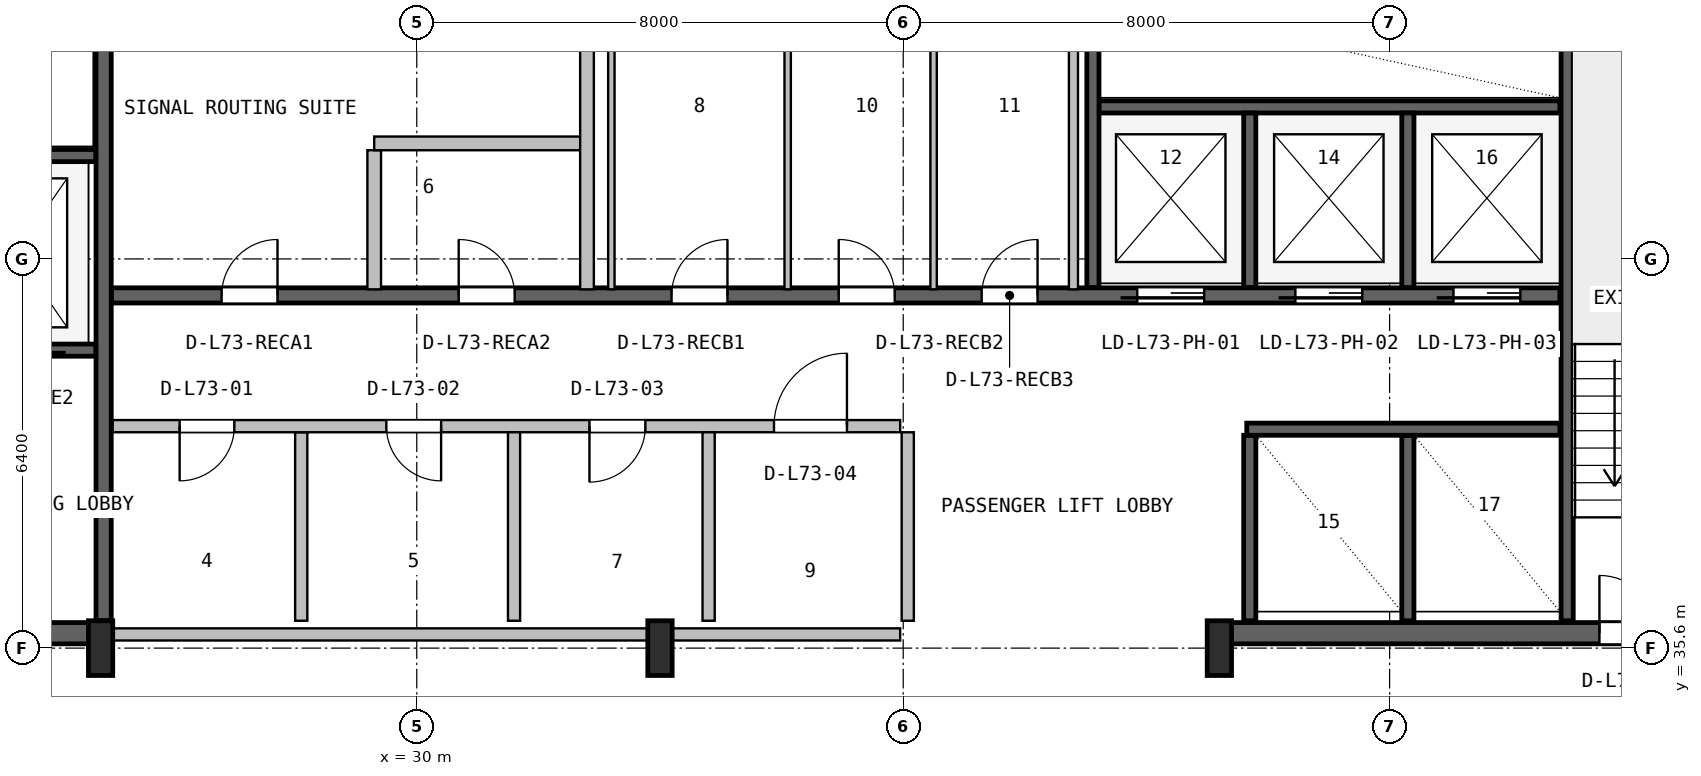
"""IFC4 building model, lengths in metres.
Left out: names, types, materials, properties, quantities, classifications, styles, units other than length and angle.
Written with IfcOpenShell. Run it as: python <this file> out.ifc"""

import sys

from ifc_helpers import new_model, si_unit, direction, frame, frame_2d, origin, origin_2d, place, context, subcontext, project, spatial, rectangle, i_section, extrude, source, transform, mapped, element, fill, save


model = new_model("IFC4")
c1 = context("Model", 3, precision=1e-05, world=origin(), true_north=direction((0.0, 1.0)))
c2 = subcontext(c1, "Body", "Model", "MODEL_VIEW")
j1 = project(units=[si_unit("LENGTHUNIT", "METRE"), si_unit("PLANEANGLEUNIT", "RADIAN")], contexts=[c1])
p1 = place(None, origin())
s1 = spatial("IfcSite", under=j1, at=p1, CompositionType="ELEMENT")
p2 = place(p1, origin())
s2 = spatial("IfcBuilding", under=s1, at=p2, CompositionType="ELEMENT")
p3 = place(p2, frame((0.0, 0.0, 292.6)))
s3 = spatial("IfcBuildingStorey", under=s2, at=p3, CompositionType="ELEMENT", Elevation=292.6)
p4 = place(p3, frame((15.67, 35.845, 0.0), z_axis=(0.0, 0.0, 1.0), x_axis=(1.0, 0.0, 0.0)))
e1 = element("IfcWall", 1, at=p4, inside=s3, PredefinedType="SHEAR", context=c2, shape_type="SweptSolid", body=[
    extrude(rectangle(XDim=9.13, YDim=0.35, at=frame_2d((4.565, 0.0))), origin(), (0.0, 0.0, 1.0), 3.55),
])
p5 = place(p4, frame((5.4, 0.0, 0.0)))
e2 = element("IfcOpeningElement", 2, at=p5, cuts=e1, PredefinedType="OPENING", context=c2, shape_type="SweptSolid", body=[
    extrude(rectangle(XDim=1.0, YDim=2.1, at=frame_2d((0.5, 1.05))), frame((0.0, 0.185, 0.0), z_axis=(0.0, -1.0, 0.0), x_axis=(1.0, 0.0, 0.0)), (0.0, 0.0, 1.0), 0.37),
])
p6 = place(p3, frame((43.2, 35.845, 0.0), z_axis=(0.0, 0.0, 1.0), x_axis=(1.0, 0.0, 0.0)))
e3 = element("IfcWall", 3, at=p6, inside=s3, PredefinedType="SHEAR", context=c2, shape_type="SweptSolid", body=[
    extrude(rectangle(XDim=9.13, YDim=0.35, at=frame_2d((4.565, 0.0))), origin(), (0.0, 0.0, 1.0), 3.55),
])
p7 = place(p6, frame((6.25, 0.0, 0.0)))
e4 = element("IfcOpeningElement", 4, at=p7, cuts=e3, PredefinedType="OPENING", context=c2, shape_type="SweptSolid", body=[
    extrude(rectangle(XDim=0.95, YDim=2.1, at=frame_2d((0.475, 1.05))), frame((0.0, 0.185, 0.0), z_axis=(0.0, -1.0, 0.0), x_axis=(1.0, 0.0, 0.0)), (0.0, 0.0, 1.0), 0.37),
])
m1 = source(origin(), c2, "Body", "SweptSolid", [
    extrude(i_section(OverallWidth=0.4, OverallDepth=0.9, WebThickness=0.016, FlangeThickness=0.028, FilletRadius=0.016, at=origin_2d()), origin(), (0.0, 0.0, 1.0), 3.8),
])
for number, where, z_axis, x_axis in (
    (5, (24.8, 35.6, 0.0), (0.0, 0.0, 1.0), (1.0, 0.0, 0.0)),
    (6, (34.0, 35.6, 0.0), (0.0, 0.0, 1.0), (1.0, 0.0, 0.0)),
    (7, (43.2, 35.6, 0.0), (0.0, 0.0, 1.0), (1.0, 0.0, 0.0)),
):
    element("IfcColumn", number, at=place(p3, frame(where, z_axis=z_axis, x_axis=x_axis)), inside=s3, PredefinedType="COLUMN", context=c2, shape_type="MappedRepresentation", body=[
        mapped(m1, transform((0.0, 0.0, 0.0), x_axis=(1.0, 0.0, 0.0), y_axis=(0.0, 1.0, 0.0), z_axis=(0.0, 0.0, 1.0), scale=1.0)),
    ])
p8 = place(p3, frame((24.85, 36.05, 0.0), z_axis=(0.0, 0.0, 1.0), x_axis=(0.0, 1.0, 0.0)))
e8 = element("IfcWall", 8, at=p8, inside=s3, PredefinedType="SHEAR", context=c2, shape_type="SweptSolid", body=[
    extrude(rectangle(XDim=10.45, YDim=0.25, at=frame_2d((5.225, 0.0))), origin(), (0.0, 0.0, 1.0), 3.55),
])
p9 = place(p3, frame((19.2, 40.5, 0.0), z_axis=(0.0, 0.0, 1.0), x_axis=(1.0, 0.0, 0.0)))
e9 = element("IfcWall", 9, at=p9, inside=s3, PredefinedType="SHEAR", context=c2, shape_type="SweptSolid", body=[
    extrude(rectangle(XDim=5.52, YDim=0.2, at=frame_2d((2.76, 0.0))), origin(), (0.0, 0.0, 1.0), 3.55),
])
p10 = place(p9, frame((1.05, 0.0, 0.0)))
e10 = element("IfcOpeningElement", 10, at=p10, cuts=e9, PredefinedType="OPENING", context=c2, shape_type="SweptSolid", body=[
    extrude(rectangle(XDim=1.1, YDim=2.18, at=frame_2d((0.55, 1.09))), frame((0.0, 0.11, 0.0), z_axis=(0.0, -1.0, 0.0), x_axis=(1.0, 0.0, 0.0)), (0.0, 0.0, 1.0), 0.22),
])
p11 = place(p9, frame((3.65, 0.0, 0.0)))
e11 = element("IfcOpeningElement", 11, at=p11, cuts=e9, PredefinedType="OPENING", context=c2, shape_type="SweptSolid", body=[
    extrude(rectangle(XDim=1.1, YDim=2.18, at=frame_2d((0.55, 1.09))), frame((0.0, 0.11, 0.0), z_axis=(0.0, -1.0, 0.0), x_axis=(1.0, 0.0, 0.0)), (0.0, 0.0, 1.0), 0.22),
])
p12 = place(p3, frame((19.2, 43.7, 0.0), z_axis=(0.0, 0.0, 1.0), x_axis=(1.0, 0.0, 0.0)))
e12 = element("IfcWall", 12, at=p12, inside=s3, PredefinedType="SHEAR", context=c2, shape_type="SweptSolid", body=[
    extrude(rectangle(XDim=5.52, YDim=0.2, at=frame_2d((2.76, 0.0))), origin(), (0.0, 0.0, 1.0), 3.55),
])
p13 = place(p3, frame((48.92, 36.05, 0.0), z_axis=(0.0, 0.0, 1.0), x_axis=(0.0, 1.0, 0.0)))
e13 = element("IfcWall", 13, at=p13, inside=s3, PredefinedType="SHEAR", context=c2, shape_type="SweptSolid", body=[
    extrude(rectangle(XDim=10.5, YDim=0.2, at=frame_2d((5.25, 0.0))), origin(), (0.0, 0.0, 1.0), 3.55),
])
p14 = place(p3, frame((24.98, 41.4, 0.0), z_axis=(0.0, 0.0, 1.0), x_axis=(1.0, 0.0, 0.0)))
e14 = element("IfcWall", 14, at=p14, inside=s3, PredefinedType="SHEAR", context=c2, shape_type="SweptSolid", body=[
    extrude(rectangle(XDim=23.82, YDim=0.25, at=frame_2d((11.91, 0.0))), origin(), (0.0, 0.0, 1.0), 3.55),
])
p15 = place(p14, frame((16.87, 0.0, 0.0)))
e15 = element("IfcOpeningElement", 15, at=p15, cuts=e14, PredefinedType="OPENING", context=c2, shape_type="SweptSolid", body=[
    extrude(rectangle(XDim=1.1, YDim=2.18, at=frame_2d((0.55, 1.09))), frame((0.0, 0.135, 0.0), z_axis=(0.0, -1.0, 0.0), x_axis=(1.0, 0.0, 0.0)), (0.0, 0.0, 1.0), 0.27),
])
p16 = place(p14, frame((19.47, 0.0, 0.0)))
e16 = element("IfcOpeningElement", 16, at=p16, cuts=e14, PredefinedType="OPENING", context=c2, shape_type="SweptSolid", body=[
    extrude(rectangle(XDim=1.1, YDim=2.18, at=frame_2d((0.55, 1.09))), frame((0.0, 0.135, 0.0), z_axis=(0.0, -1.0, 0.0), x_axis=(1.0, 0.0, 0.0)), (0.0, 0.0, 1.0), 0.27),
])
p17 = place(p14, frame((22.07, 0.0, 0.0)))
e17 = element("IfcOpeningElement", 17, at=p17, cuts=e14, PredefinedType="OPENING", context=c2, shape_type="SweptSolid", body=[
    extrude(rectangle(XDim=1.1, YDim=2.18, at=frame_2d((0.55, 1.09))), frame((0.0, 0.135, 0.0), z_axis=(0.0, -1.0, 0.0), x_axis=(1.0, 0.0, 0.0)), (0.0, 0.0, 1.0), 0.27),
])
p18 = place(p14, frame((1.81, 0.0, 0.0)))
e18 = element("IfcOpeningElement", 18, at=p18, cuts=e14, PredefinedType="OPENING", context=c2, shape_type="SweptSolid", body=[
    extrude(rectangle(XDim=0.92, YDim=2.08, at=frame_2d((0.46, 1.04))), frame((0.0, 0.135, 0.0), z_axis=(0.0, -1.0, 0.0), x_axis=(1.0, 0.0, 0.0)), (0.0, 0.0, 1.0), 0.27),
])
p19 = place(p14, frame((5.71, 0.0, 0.0)))
e19 = element("IfcOpeningElement", 19, at=p19, cuts=e14, PredefinedType="OPENING", context=c2, shape_type="SweptSolid", body=[
    extrude(rectangle(XDim=0.92, YDim=2.08, at=frame_2d((0.46, 1.04))), frame((0.0, 0.135, 0.0), z_axis=(0.0, -1.0, 0.0), x_axis=(1.0, 0.0, 0.0)), (0.0, 0.0, 1.0), 0.27),
])
p20 = place(p14, frame((9.21, 0.0, 0.0)))
e20 = element("IfcOpeningElement", 20, at=p20, cuts=e14, PredefinedType="OPENING", context=c2, shape_type="SweptSolid", body=[
    extrude(rectangle(XDim=0.92, YDim=2.08, at=frame_2d((0.46, 1.04))), frame((0.0, 0.135, 0.0), z_axis=(0.0, -1.0, 0.0), x_axis=(1.0, 0.0, 0.0)), (0.0, 0.0, 1.0), 0.27),
])
p21 = place(p14, frame((11.96, 0.0, 0.0)))
e21 = element("IfcOpeningElement", 21, at=p21, cuts=e14, PredefinedType="OPENING", context=c2, shape_type="SweptSolid", body=[
    extrude(rectangle(XDim=0.92, YDim=2.08, at=frame_2d((0.46, 1.04))), frame((0.0, 0.135, 0.0), z_axis=(0.0, -1.0, 0.0), x_axis=(1.0, 0.0, 0.0)), (0.0, 0.0, 1.0), 0.27),
])
p22 = place(p14, frame((14.31, 0.0, 0.0)))
e22 = element("IfcOpeningElement", 22, at=p22, cuts=e14, PredefinedType="OPENING", context=c2, shape_type="SweptSolid", body=[
    extrude(rectangle(XDim=0.92, YDim=2.08, at=frame_2d((0.46, 1.04))), frame((0.0, 0.135, 0.0), z_axis=(0.0, -1.0, 0.0), x_axis=(1.0, 0.0, 0.0)), (0.0, 0.0, 1.0), 0.27),
])
p23 = place(p3, frame((41.22, 44.5, 0.0), z_axis=(0.0, 0.0, 1.0), x_axis=(1.0, 0.0, 0.0)))
e23 = element("IfcWall", 23, at=p23, inside=s3, PredefinedType="SHEAR", context=c2, shape_type="SweptSolid", body=[
    extrude(rectangle(XDim=7.58, YDim=0.2, at=frame_2d((3.79, 0.0))), origin(), (0.0, 0.0, 1.0), 3.55),
])
p24 = place(p3, frame((41.12, 41.53, 0.0), z_axis=(0.0, 0.0, 1.0), x_axis=(0.0, 1.0, 0.0)))
e24 = element("IfcWall", 24, at=p24, inside=s3, PredefinedType="SHEAR", context=c2, shape_type="SweptSolid", body=[
    extrude(rectangle(XDim=5.02, YDim=0.2, at=frame_2d((2.51, 0.0))), origin(), (0.0, 0.0, 1.0), 3.55),
])
for number, where, z_axis, x_axis in (
    (25, (43.7, 41.53, 0.0), (0.0, 0.0, 1.0), (0.0, 1.0, 0.0)),
    (26, (46.3, 41.53, 0.0), (0.0, 0.0, 1.0), (0.0, 1.0, 0.0)),
):
    element("IfcWall", number, at=place(p3, frame(where, z_axis=z_axis, x_axis=x_axis)), inside=s3, PredefinedType="SHEAR", context=c2, shape_type="SweptSolid", body=[
        extrude(rectangle(XDim=2.87, YDim=0.2, at=frame_2d((1.435, 0.0))), origin(), (0.0, 0.0, 1.0), 3.55),
    ])
for number, where, z_axis, x_axis in (
    (27, (43.7, 36.05, 0.0), (0.0, 0.0, 1.0), (0.0, 1.0, 0.0)),
    (28, (46.3, 36.05, 0.0), (0.0, 0.0, 1.0), (0.0, 1.0, 0.0)),
):
    element("IfcWall", number, at=place(p3, frame(where, z_axis=z_axis, x_axis=x_axis)), inside=s3, PredefinedType="SHEAR", context=c2, shape_type="SweptSolid", body=[
        extrude(rectangle(XDim=3.05, YDim=0.2, at=frame_2d((1.525, 0.0))), origin(), (0.0, 0.0, 1.0), 3.55),
    ])
p25 = place(p3, frame((43.65, 39.2, 0.0), z_axis=(0.0, 0.0, 1.0), x_axis=(1.0, 0.0, 0.0)))
e29 = element("IfcWall", 29, at=p25, inside=s3, PredefinedType="SHEAR", context=c2, shape_type="SweptSolid", body=[
    extrude(rectangle(XDim=5.15, YDim=0.2, at=frame_2d((2.575, 0.0))), origin(), (0.0, 0.0, 1.0), 3.55),
])
p26 = place(p3, frame((25.0, 35.825, 0.0), z_axis=(0.0, 0.0, 1.0), x_axis=(1.0, 0.0, 0.0)))
e30 = element("IfcWall", 30, at=p26, inside=s3, PredefinedType="SOLIDWALL", context=c2, shape_type="SweptSolid", body=[
    extrude(rectangle(XDim=12.95, YDim=0.2, at=frame_2d((6.475, 0.0))), origin(), (0.0, 0.0, 1.0), 2.575),
])
p27 = place(p3, frame((28.1, 36.05, 0.0), z_axis=(0.0, 0.0, 1.0), x_axis=(0.0, 1.0, 0.0)))
e31 = element("IfcWall", 31, at=p27, inside=s3, PredefinedType="PLUMBINGWALL", context=c2, shape_type="SweptSolid", body=[
    extrude(rectangle(XDim=3.1, YDim=0.2, at=frame_2d((1.55, 0.0))), origin(), (0.0, 0.0, 1.0), 3.53),
])
p28 = place(p3, frame((25.0, 39.25, 0.0), z_axis=(0.0, 0.0, 1.0), x_axis=(1.0, 0.0, 0.0)))
e32 = element("IfcWall", 32, at=p28, inside=s3, PredefinedType="SOLIDWALL", context=c2, shape_type="SweptSolid", body=[
    extrude(rectangle(XDim=12.95, YDim=0.2, at=frame_2d((6.475, 0.0))), origin(), (0.0, 0.0, 1.0), 3.53),
])
p29 = place(p28, frame((1.1, 0.0, 0.0)))
e33 = element("IfcOpeningElement", 33, at=p29, cuts=e32, PredefinedType="OPENING", context=c2, shape_type="SweptSolid", body=[
    extrude(rectangle(XDim=0.9, YDim=2.06, at=frame_2d((0.45, 1.03))), frame((0.0, 0.11, 0.0), z_axis=(0.0, -1.0, 0.0), x_axis=(1.0, 0.0, 0.0)), (0.0, 0.0, 1.0), 0.22),
])
p30 = place(p28, frame((4.5, 0.0, 0.0)))
e34 = element("IfcOpeningElement", 34, at=p30, cuts=e32, PredefinedType="OPENING", context=c2, shape_type="SweptSolid", body=[
    extrude(rectangle(XDim=0.9, YDim=2.06, at=frame_2d((0.45, 1.03))), frame((0.0, 0.11, 0.0), z_axis=(0.0, -1.0, 0.0), x_axis=(1.0, 0.0, 0.0)), (0.0, 0.0, 1.0), 0.22),
])
p31 = place(p28, frame((7.84, 0.0, 0.0)))
e35 = element("IfcOpeningElement", 35, at=p31, cuts=e32, PredefinedType="OPENING", context=c2, shape_type="SweptSolid", body=[
    extrude(rectangle(XDim=0.92, YDim=2.08, at=frame_2d((0.46, 1.04))), frame((0.0, 0.11, 0.0), z_axis=(0.0, -1.0, 0.0), x_axis=(1.0, 0.0, 0.0)), (0.0, 0.0, 1.0), 0.22),
])
p32 = place(p28, frame((10.875, 0.0, 0.0)))
e36 = element("IfcOpeningElement", 36, at=p32, cuts=e32, PredefinedType="OPENING", context=c2, shape_type="SweptSolid", body=[
    extrude(rectangle(XDim=1.2, YDim=2.1, at=frame_2d((0.6, 1.05))), frame((0.0, 0.11, 0.0), z_axis=(0.0, -1.0, 0.0), x_axis=(1.0, 0.0, 0.0)), (0.0, 0.0, 1.0), 0.22),
])
p33 = place(p3, frame((31.6, 36.05, 0.0), z_axis=(0.0, 0.0, 1.0), x_axis=(0.0, 1.0, 0.0)))
e37 = element("IfcWall", 37, at=p33, inside=s3, PredefinedType="PLUMBINGWALL", context=c2, shape_type="SweptSolid", body=[
    extrude(rectangle(XDim=3.1, YDim=0.2, at=frame_2d((1.55, 0.0))), origin(), (0.0, 0.0, 1.0), 3.53),
])
for number, where, z_axis, x_axis in (
    (38, (34.8, 36.05, 0.0), (0.0, 0.0, 1.0), (0.0, 1.0, 0.0)),
    (39, (38.075, 36.05, 0.0), (0.0, 0.0, 1.0), (0.0, 1.0, 0.0)),
):
    element("IfcWall", number, at=place(p3, frame(where, z_axis=z_axis, x_axis=x_axis)), inside=s3, PredefinedType="SOLIDWALL", context=c2, shape_type="SweptSolid", body=[
        extrude(rectangle(XDim=3.1, YDim=0.2, at=frame_2d((1.55, 0.0))), origin(), (0.0, 0.0, 1.0), 3.53),
    ])
p34 = place(p3, frame((29.3, 41.5, 0.0), z_axis=(0.0, 0.0, 1.0), x_axis=(0.0, 1.0, 0.0)))
e40 = element("IfcWall", 40, at=p34, inside=s3, PredefinedType="PARTITIONING", context=c2, shape_type="SweptSolid", body=[
    extrude(rectangle(XDim=2.288, YDim=0.225, at=frame_2d((1.144, 0.0))), origin(), (0.0, 0.0, 1.0), 3.53),
])
p35 = place(p3, frame((29.3, 43.9, 0.0), z_axis=(0.0, 0.0, 1.0), x_axis=(1.0, 0.0, 0.0)))
e41 = element("IfcWall", 41, at=p35, inside=s3, PredefinedType="PARTITIONING", context=c2, shape_type="SweptSolid", body=[
    extrude(rectangle(XDim=3.5, YDim=0.225, at=frame_2d((1.75, 0.0))), origin(), (0.0, 0.0, 1.0), 3.53),
])
p36 = place(p3, frame((32.8, 41.5, 0.0), z_axis=(0.0, 0.0, 1.0), x_axis=(0.0, 1.0, 0.0)))
e42 = element("IfcWall", 42, at=p36, inside=s3, PredefinedType="PARTITIONING", context=c2, shape_type="SweptSolid", body=[
    extrude(rectangle(XDim=5.02, YDim=0.225, at=frame_2d((2.51, 0.0))), origin(), (0.0, 0.0, 1.0), 3.53),
])
for number, where, z_axis, x_axis in (
    (43, (36.1, 41.5, 0.0), (0.0, 0.0, 1.0), (0.0, 1.0, 0.0)),
    (44, (33.2, 41.5, 0.0), (0.0, 0.0, 1.0), (0.0, 1.0, 0.0)),
    (45, (38.5, 41.5, 0.0), (0.0, 0.0, 1.0), (0.0, 1.0, 0.0)),
):
    element("IfcWall", number, at=place(p3, frame(where, z_axis=z_axis, x_axis=x_axis)), inside=s3, PredefinedType="PARTITIONING", context=c2, shape_type="SweptSolid", body=[
        extrude(rectangle(XDim=5.02, YDim=0.105, at=frame_2d((2.51, 0.0))), origin(), (0.0, 0.0, 1.0), 3.53),
    ])
p37 = place(p3, frame((40.8, 41.5, 0.0), z_axis=(0.0, 0.0, 1.0), x_axis=(0.0, 1.0, 0.0)))
e46 = element("IfcWall", 46, at=p37, inside=s3, PredefinedType="PARTITIONING", context=c2, shape_type="SweptSolid", body=[
    extrude(rectangle(XDim=5.02, YDim=0.15, at=frame_2d((2.51, 0.0))), origin(), (0.0, 0.0, 1.0), 3.53),
])
m2 = source(origin(), c2, "Body", "SweptSolid", [
    extrude(rectangle(XDim=0.95, YDim=2.1, at=frame_2d((0.475, 1.05))), frame((0.0, 0.025, 0.0), z_axis=(0.0, -1.0, 0.0), x_axis=(1.0, 0.0, 0.0)), (0.0, 0.0, 1.0), 0.05),
])
p38 = place(p7, origin())
e47 = element("IfcDoor", 47, at=p38, inside=s3, OperationType="SINGLE_SWING_LEFT", PredefinedType="DOOR", context=c2, shape_type="MappedRepresentation", body=[
    mapped(m2, transform((0.0, 0.0, 0.0), x_axis=(1.0, 0.0, 0.0), y_axis=(0.0, 1.0, 0.0), z_axis=(0.0, 0.0, 1.0), scale=1.0)),
])
fill(e4, e47)
m3 = source(origin(), c2, "Body", "SweptSolid", [
    extrude(rectangle(XDim=1.1, YDim=2.18, at=frame_2d((0.55, 1.09))), frame((0.0, 0.025, 0.0), z_axis=(0.0, -1.0, 0.0), x_axis=(1.0, 0.0, 0.0)), (0.0, 0.0, 1.0), 0.05),
])
p39 = place(p15, frame((1.1, 0.0, 0.0), z_axis=(0.0, 0.0, 1.0), x_axis=(-1.0, 0.0, 0.0)))
e48 = element("IfcDoor", 48, at=p39, inside=s3, OperationType="SLIDING_TO_LEFT", PredefinedType="DOOR", context=c2, shape_type="MappedRepresentation", body=[
    mapped(m3, transform((0.0, 0.0, 0.0), x_axis=(1.0, 0.0, 0.0), y_axis=(0.0, 1.0, 0.0), z_axis=(0.0, 0.0, 1.0), scale=1.0)),
])
fill(e15, e48)
p40 = place(p16, frame((1.1, 0.0, 0.0), z_axis=(0.0, 0.0, 1.0), x_axis=(-1.0, 0.0, 0.0)))
e49 = element("IfcDoor", 49, at=p40, inside=s3, OperationType="SLIDING_TO_LEFT", PredefinedType="DOOR", context=c2, shape_type="MappedRepresentation", body=[
    mapped(m3, transform((0.0, 0.0, 0.0), x_axis=(1.0, 0.0, 0.0), y_axis=(0.0, 1.0, 0.0), z_axis=(0.0, 0.0, 1.0), scale=1.0)),
])
fill(e16, e49)
p41 = place(p17, frame((1.1, 0.0, 0.0), z_axis=(0.0, 0.0, 1.0), x_axis=(-1.0, 0.0, 0.0)))
e50 = element("IfcDoor", 50, at=p41, inside=s3, OperationType="SLIDING_TO_LEFT", PredefinedType="DOOR", context=c2, shape_type="MappedRepresentation", body=[
    mapped(m3, transform((0.0, 0.0, 0.0), x_axis=(1.0, 0.0, 0.0), y_axis=(0.0, 1.0, 0.0), z_axis=(0.0, 0.0, 1.0), scale=1.0)),
])
fill(e17, e50)
m4 = source(origin(), c2, "Body", "SweptSolid", [
    extrude(rectangle(XDim=0.92, YDim=2.08, at=frame_2d((0.46, 1.04))), frame((0.0, 0.025, 0.0), z_axis=(0.0, -1.0, 0.0), x_axis=(1.0, 0.0, 0.0)), (0.0, 0.0, 1.0), 0.05),
])
p42 = place(p18, origin())
e51 = element("IfcDoor", 51, at=p42, inside=s3, OperationType="SINGLE_SWING_RIGHT", PredefinedType="DOOR", context=c2, shape_type="MappedRepresentation", body=[
    mapped(m4, transform((0.0, 0.0, 0.0), x_axis=(1.0, 0.0, 0.0), y_axis=(0.0, 1.0, 0.0), z_axis=(0.0, 0.0, 1.0), scale=1.0)),
])
fill(e18, e51)
p43 = place(p19, origin())
e52 = element("IfcDoor", 52, at=p43, inside=s3, OperationType="SINGLE_SWING_LEFT", PredefinedType="DOOR", context=c2, shape_type="MappedRepresentation", body=[
    mapped(m4, transform((0.0, 0.0, 0.0), x_axis=(1.0, 0.0, 0.0), y_axis=(0.0, 1.0, 0.0), z_axis=(0.0, 0.0, 1.0), scale=1.0)),
])
fill(e19, e52)
p44 = place(p20, origin())
e53 = element("IfcDoor", 53, at=p44, inside=s3, OperationType="SINGLE_SWING_RIGHT", PredefinedType="DOOR", context=c2, shape_type="MappedRepresentation", body=[
    mapped(m4, transform((0.0, 0.0, 0.0), x_axis=(1.0, 0.0, 0.0), y_axis=(0.0, 1.0, 0.0), z_axis=(0.0, 0.0, 1.0), scale=1.0)),
])
fill(e20, e53)
p45 = place(p21, origin())
e54 = element("IfcDoor", 54, at=p45, inside=s3, OperationType="SINGLE_SWING_LEFT", PredefinedType="DOOR", context=c2, shape_type="MappedRepresentation", body=[
    mapped(m4, transform((0.0, 0.0, 0.0), x_axis=(1.0, 0.0, 0.0), y_axis=(0.0, 1.0, 0.0), z_axis=(0.0, 0.0, 1.0), scale=1.0)),
])
fill(e21, e54)
p46 = place(p22, origin())
e55 = element("IfcDoor", 55, at=p46, inside=s3, OperationType="SINGLE_SWING_RIGHT", PredefinedType="DOOR", context=c2, shape_type="MappedRepresentation", body=[
    mapped(m4, transform((0.0, 0.0, 0.0), x_axis=(1.0, 0.0, 0.0), y_axis=(0.0, 1.0, 0.0), z_axis=(0.0, 0.0, 1.0), scale=1.0)),
])
fill(e22, e55)
m5 = source(origin(), c2, "Body", "SweptSolid", [
    extrude(rectangle(XDim=0.9, YDim=2.06, at=frame_2d((0.45, 1.03))), frame((0.0, 0.025, 0.0), z_axis=(0.0, -1.0, 0.0), x_axis=(1.0, 0.0, 0.0)), (0.0, 0.0, 1.0), 0.05),
])
p47 = place(p29, frame((0.9, 0.0, 0.0), z_axis=(0.0, 0.0, 1.0), x_axis=(-1.0, 0.0, 0.0)))
e56 = element("IfcDoor", 56, at=p47, inside=s3, OperationType="SINGLE_SWING_LEFT", PredefinedType="DOOR", context=c2, shape_type="MappedRepresentation", body=[
    mapped(m5, transform((0.0, 0.0, 0.0), x_axis=(1.0, 0.0, 0.0), y_axis=(0.0, 1.0, 0.0), z_axis=(0.0, 0.0, 1.0), scale=1.0)),
])
fill(e33, e56)
p48 = place(p30, frame((0.9, 0.0, 0.0), z_axis=(0.0, 0.0, 1.0), x_axis=(-1.0, 0.0, 0.0)))
e57 = element("IfcDoor", 57, at=p48, inside=s3, OperationType="SINGLE_SWING_RIGHT", PredefinedType="DOOR", context=c2, shape_type="MappedRepresentation", body=[
    mapped(m5, transform((0.0, 0.0, 0.0), x_axis=(1.0, 0.0, 0.0), y_axis=(0.0, 1.0, 0.0), z_axis=(0.0, 0.0, 1.0), scale=1.0)),
])
fill(e34, e57)
p49 = place(p31, frame((0.92, 0.0, 0.0), z_axis=(0.0, 0.0, 1.0), x_axis=(-1.0, 0.0, 0.0)))
e58 = element("IfcDoor", 58, at=p49, inside=s3, OperationType="SINGLE_SWING_LEFT", PredefinedType="DOOR", context=c2, shape_type="MappedRepresentation", body=[
    mapped(m4, transform((0.0, 0.0, 0.0), x_axis=(1.0, 0.0, 0.0), y_axis=(0.0, 1.0, 0.0), z_axis=(0.0, 0.0, 1.0), scale=1.0)),
])
fill(e35, e58)
m6 = source(origin(), c2, "Body", "SweptSolid", [
    extrude(rectangle(XDim=1.2, YDim=2.1, at=frame_2d((0.6, 1.05))), frame((0.0, 0.025, 0.0), z_axis=(0.0, -1.0, 0.0), x_axis=(1.0, 0.0, 0.0)), (0.0, 0.0, 1.0), 0.05),
])
p50 = place(p32, origin())
e59 = element("IfcDoor", 59, at=p50, inside=s3, OperationType="SINGLE_SWING_RIGHT", PredefinedType="DOOR", context=c2, shape_type="MappedRepresentation", body=[
    mapped(m6, transform((0.0, 0.0, 0.0), x_axis=(1.0, 0.0, 0.0), y_axis=(0.0, 1.0, 0.0), z_axis=(0.0, 0.0, 1.0), scale=1.0)),
])
fill(e36, e59)
save(model, sys.argv[1])
